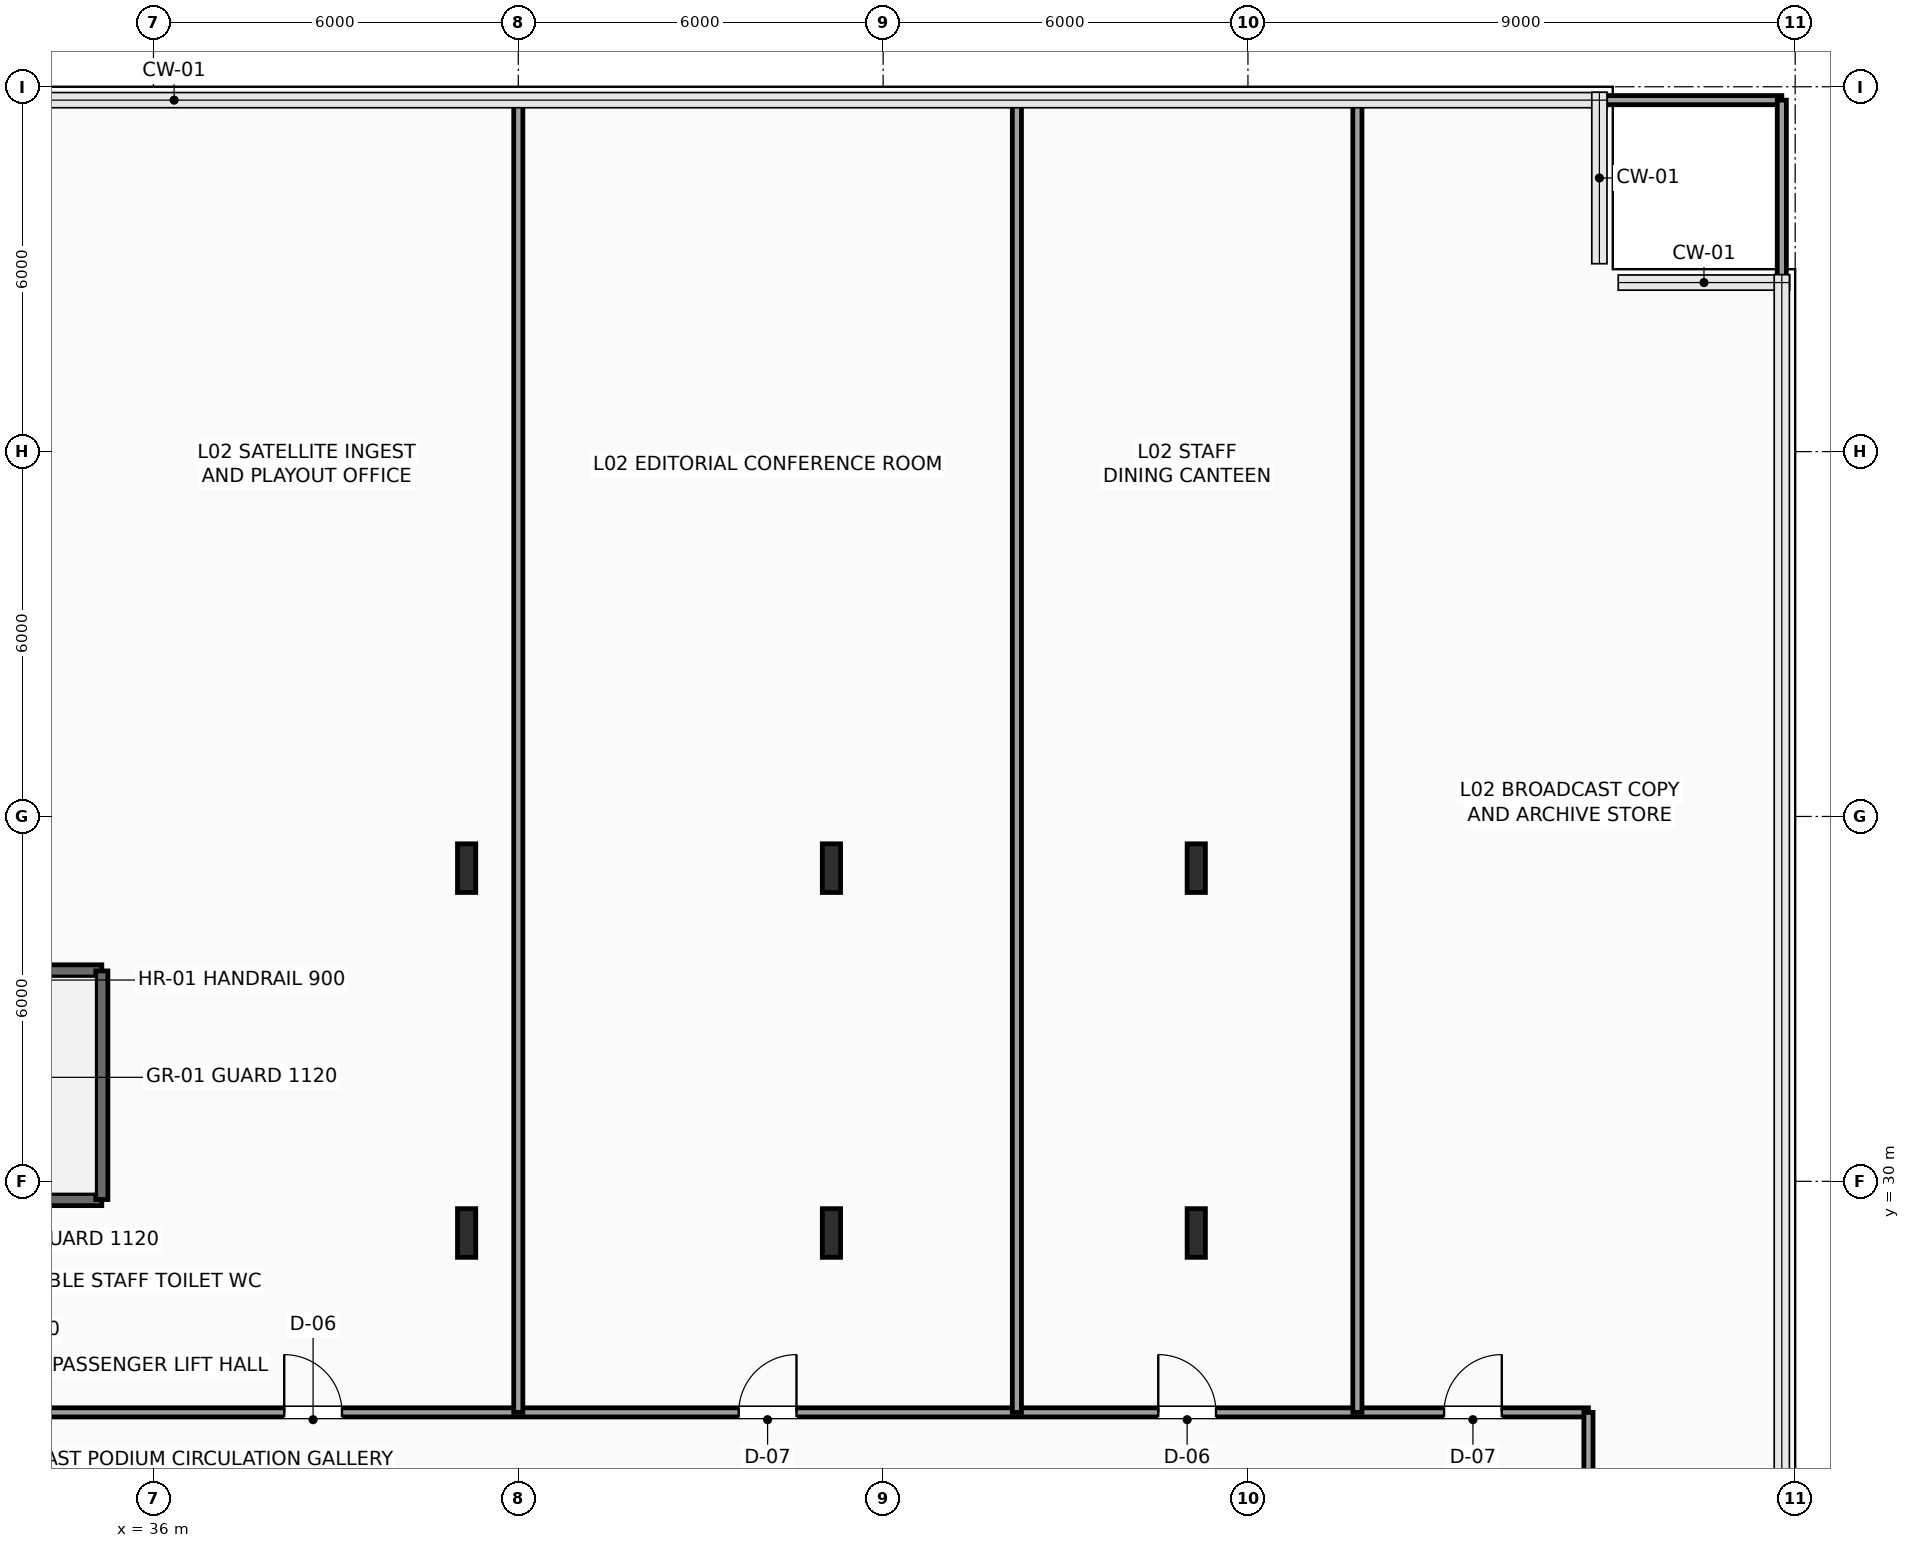
"""IFC4 building model, lengths in metres.
Left out: names, types, materials, properties, quantities, classifications, styles, units other than length and angle.
Written with IfcOpenShell. Run it as: python <this file> out.ifc"""

import sys

from ifc_helpers import new_model, si_unit, direction, frame, frame_2d, origin, origin_2d, place, context, subcontext, project, spatial, rectangle, i_section, extrude, element, fill, save


model = new_model("IFC4")
c1 = context("Model", 3, precision=1e-05, world=origin(), true_north=direction((0.0, 1.0)))
c2 = subcontext(c1, "Body", "Model", "MODEL_VIEW")
j1 = project(units=[si_unit("LENGTHUNIT", "METRE"), si_unit("PLANEANGLEUNIT", "RADIAN")], contexts=[c1])
p1 = place(None, origin())
s1 = spatial("IfcSite", under=j1, at=p1, CompositionType="ELEMENT")
p2 = place(p1, origin())
s2 = spatial("IfcBuilding", under=s1, at=p2, CompositionType="ELEMENT")
p3 = place(p2, frame((0.0, 0.0, 11.1)))
s3 = spatial("IfcBuildingStorey", under=s2, at=p3, CompositionType="ELEMENT", Elevation=11.1)
for number, where, z_axis, x_axis in (
    (1, (41.15, 29.15, 0.0), (0.0, 0.0, 1.0), (1.0, 0.0, 0.0)),
    (2, (41.15, 35.15, 0.0), (0.0, 0.0, 1.0), (1.0, 0.0, 0.0)),
    (3, (47.15, 29.15, 0.0), (0.0, 0.0, 1.0), (1.0, 0.0, 0.0)),
    (4, (47.15, 35.15, 0.0), (0.0, 0.0, 1.0), (1.0, 0.0, 0.0)),
    (5, (53.15, 29.15, 0.0), (0.0, 0.0, 1.0), (1.0, 0.0, 0.0)),
    (6, (53.15, 35.15, 0.0), (0.0, 0.0, 1.0), (1.0, 0.0, 0.0)),
):
    element("IfcColumn", number, at=place(p3, frame(where, z_axis=z_axis, x_axis=x_axis)), inside=s3, PredefinedType="COLUMN", context=c2, shape_type="SweptSolid", body=[
        extrude(i_section(OverallWidth=0.3, OverallDepth=0.8, WebThickness=0.018, FlangeThickness=0.033, FilletRadius=0.03, at=origin_2d()), origin(), (0.0, 0.0, 1.0), 5.4),
    ])
p4 = place(p3, frame((26.1, 29.7, 0.0), z_axis=(0.0, 0.0, 1.0), x_axis=(1.0, 0.0, 0.0)))
e7 = element("IfcWall", 7, at=p4, inside=s3, PredefinedType="SHEAR", context=c2, shape_type="SweptSolid", body=[
    extrude(rectangle(XDim=9.05, YDim=0.2, at=frame_2d((4.525, 0.0))), origin(), (0.0, 0.0, 1.0), 5.1),
])
p5 = place(p4, frame((0.35, 0.0, 0.0)))
e8 = element("IfcOpeningElement", 8, at=p5, cuts=e7, PredefinedType="OPENING", context=c2, shape_type="SweptSolid", body=[
    extrude(rectangle(XDim=1.1, YDim=2.2, at=frame_2d((0.55, 1.1))), frame((0.0, 0.11, 0.0), z_axis=(0.0, -1.0, 0.0), x_axis=(1.0, 0.0, 0.0)), (0.0, 0.0, 1.0), 0.22),
])
p6 = place(p3, frame((26.1, 33.46, 0.0), z_axis=(0.0, 0.0, 1.0), x_axis=(1.0, 0.0, 0.0)))
e9 = element("IfcWall", 9, at=p6, inside=s3, PredefinedType="SHEAR", context=c2, shape_type="SweptSolid", body=[
    extrude(rectangle(XDim=9.05, YDim=0.2, at=frame_2d((4.525, 0.0))), origin(), (0.0, 0.0, 1.0), 5.1),
])
p7 = place(p3, frame((35.15, 29.7, 0.0), z_axis=(0.0, 0.0, 1.0), x_axis=(0.0, 1.0, 0.0)))
e10 = element("IfcWall", 10, at=p7, inside=s3, PredefinedType="SHEAR", context=c2, shape_type="SweptSolid", body=[
    extrude(rectangle(XDim=3.76, YDim=0.2, at=frame_2d((1.88, 0.0))), origin(), (0.0, 0.0, 1.0), 5.1),
])
p8 = place(p3, frame((26.05, 26.2, 0.0), z_axis=(0.0, 0.0, 1.0), x_axis=(1.0, 0.0, 0.0)))
e11 = element("IfcWall", 11, at=p8, inside=s3, PredefinedType="PARTITIONING", context=c2, shape_type="SweptSolid", body=[
    extrude(rectangle(XDim=33.55, YDim=0.15, at=frame_2d((16.775, 0.0))), origin(), (0.0, 0.0, 1.0), 5.1),
])
p9 = place(p8, frame((2.45, 0.0, 0.0)))
e12 = element("IfcOpeningElement", 12, at=p9, cuts=e11, PredefinedType="OPENING", context=c2, shape_type="SweptSolid", body=[
    extrude(rectangle(XDim=0.9, YDim=2.1, at=frame_2d((0.45, 1.05))), frame((0.0, 0.085, 0.0), z_axis=(0.0, -1.0, 0.0), x_axis=(1.0, 0.0, 0.0)), (0.0, 0.0, 1.0), 0.17),
])
p10 = place(p8, frame((12.1, 0.0, 0.0)))
e13 = element("IfcOpeningElement", 13, at=p10, cuts=e11, PredefinedType="OPENING", context=c2, shape_type="SweptSolid", body=[
    extrude(rectangle(XDim=0.95, YDim=2.15, at=frame_2d((0.475, 1.075))), frame((0.0, 0.085, 0.0), z_axis=(0.0, -1.0, 0.0), x_axis=(1.0, 0.0, 0.0)), (0.0, 0.0, 1.0), 0.17),
])
p11 = place(p8, frame((19.575, 0.0, 0.0)))
e14 = element("IfcOpeningElement", 14, at=p11, cuts=e11, PredefinedType="OPENING", context=c2, shape_type="SweptSolid", body=[
    extrude(rectangle(XDim=0.95, YDim=2.15, at=frame_2d((0.475, 1.075))), frame((0.0, 0.085, 0.0), z_axis=(0.0, -1.0, 0.0), x_axis=(1.0, 0.0, 0.0)), (0.0, 0.0, 1.0), 0.17),
])
p12 = place(p8, frame((26.475, 0.0, 0.0)))
e15 = element("IfcOpeningElement", 15, at=p12, cuts=e11, PredefinedType="OPENING", context=c2, shape_type="SweptSolid", body=[
    extrude(rectangle(XDim=0.95, YDim=2.15, at=frame_2d((0.475, 1.075))), frame((0.0, 0.085, 0.0), z_axis=(0.0, -1.0, 0.0), x_axis=(1.0, 0.0, 0.0)), (0.0, 0.0, 1.0), 0.17),
])
p13 = place(p8, frame((31.175, 0.0, 0.0)))
e16 = element("IfcOpeningElement", 16, at=p13, cuts=e11, PredefinedType="OPENING", context=c2, shape_type="SweptSolid", body=[
    extrude(rectangle(XDim=0.95, YDim=2.15, at=frame_2d((0.475, 1.075))), frame((0.0, 0.085, 0.0), z_axis=(0.0, -1.0, 0.0), x_axis=(1.0, 0.0, 0.0)), (0.0, 0.0, 1.0), 0.17),
])
p14 = place(p3, frame((59.6, 26.2, 0.0), z_axis=(0.0, 0.0, 1.0), x_axis=(0.0, -1.0, 0.0)))
e17 = element("IfcWall", 17, at=p14, inside=s3, PredefinedType="PARTITIONING", context=c2, shape_type="SweptSolid", body=[
    extrude(rectangle(XDim=2.56, YDim=0.15, at=frame_2d((1.28, 0.0))), origin(), (0.0, 0.0, 1.0), 5.1),
])
for number, where, z_axis, x_axis in (
    (18, (42.0, 26.2, 0.0), (0.0, 0.0, 1.0), (0.0, 1.0, 0.0)),
    (19, (50.2, 26.2, 0.0), (0.0, 0.0, 1.0), (0.0, 1.0, 0.0)),
    (20, (55.8, 26.2, 0.0), (0.0, 0.0, 1.0), (0.0, 1.0, 0.0)),
):
    element("IfcWall", number, at=place(p3, frame(where, z_axis=z_axis, x_axis=x_axis)), inside=s3, PredefinedType="PARTITIONING", context=c2, shape_type="SweptSolid", body=[
        extrude(rectangle(XDim=21.58, YDim=0.15, at=frame_2d((10.79, 0.0))), origin(), (0.0, 0.0, 1.0), 5.1),
    ])
p15 = place(p3, frame((55.8, 47.78, 0.0), z_axis=(0.0, 0.0, 1.0), x_axis=(1.0, 0.0, 0.0)))
e21 = element("IfcWall", 21, at=p15, inside=s3, PredefinedType="PARTITIONING", context=c2, shape_type="SweptSolid", body=[
    extrude(rectangle(XDim=6.98, YDim=0.15, at=frame_2d((3.49, 0.0))), origin(), (0.0, 0.0, 1.0), 5.1),
])
p16 = place(p3, frame((62.78, 26.2, 0.0), z_axis=(0.0, 0.0, 1.0), x_axis=(0.0, 1.0, 0.0)))
e22 = element("IfcWall", 22, at=p16, inside=s3, PredefinedType="PARTITIONING", context=c2, shape_type="SweptSolid", body=[
    extrude(rectangle(XDim=21.58, YDim=0.15, at=frame_2d((10.79, 0.0))), origin(), (0.0, 0.0, 1.0), 5.1),
])
p17 = place(p10, origin())
e23 = element("IfcDoor", 23, at=p17, inside=s3, OperationType="SINGLE_SWING_LEFT", PredefinedType="DOOR", context=c2, shape_type="SweptSolid", body=[
    extrude(rectangle(XDim=0.95, YDim=2.15, at=frame_2d((0.475, 1.075))), frame((0.0, 0.025, 0.0), z_axis=(0.0, -1.0, 0.0), x_axis=(1.0, 0.0, 0.0)), (0.0, 0.0, 1.0), 0.05),
])
fill(e13, e23)
p18 = place(p11, origin())
e24 = element("IfcDoor", 24, at=p18, inside=s3, OperationType="SINGLE_SWING_RIGHT", PredefinedType="DOOR", context=c2, shape_type="SweptSolid", body=[
    extrude(rectangle(XDim=0.95, YDim=2.15, at=frame_2d((0.475, 1.075))), frame((0.0, 0.025, 0.0), z_axis=(0.0, -1.0, 0.0), x_axis=(1.0, 0.0, 0.0)), (0.0, 0.0, 1.0), 0.05),
])
fill(e14, e24)
p19 = place(p12, origin())
e25 = element("IfcDoor", 25, at=p19, inside=s3, OperationType="SINGLE_SWING_LEFT", PredefinedType="DOOR", context=c2, shape_type="SweptSolid", body=[
    extrude(rectangle(XDim=0.95, YDim=2.15, at=frame_2d((0.475, 1.075))), frame((0.0, 0.025, 0.0), z_axis=(0.0, -1.0, 0.0), x_axis=(1.0, 0.0, 0.0)), (0.0, 0.0, 1.0), 0.05),
])
fill(e15, e25)
p20 = place(p13, origin())
e26 = element("IfcDoor", 26, at=p20, inside=s3, OperationType="SINGLE_SWING_RIGHT", PredefinedType="DOOR", context=c2, shape_type="SweptSolid", body=[
    extrude(rectangle(XDim=0.95, YDim=2.15, at=frame_2d((0.475, 1.075))), frame((0.0, 0.025, 0.0), z_axis=(0.0, -1.0, 0.0), x_axis=(1.0, 0.0, 0.0)), (0.0, 0.0, 1.0), 0.05),
])
fill(e16, e26)
save(model, sys.argv[1])
